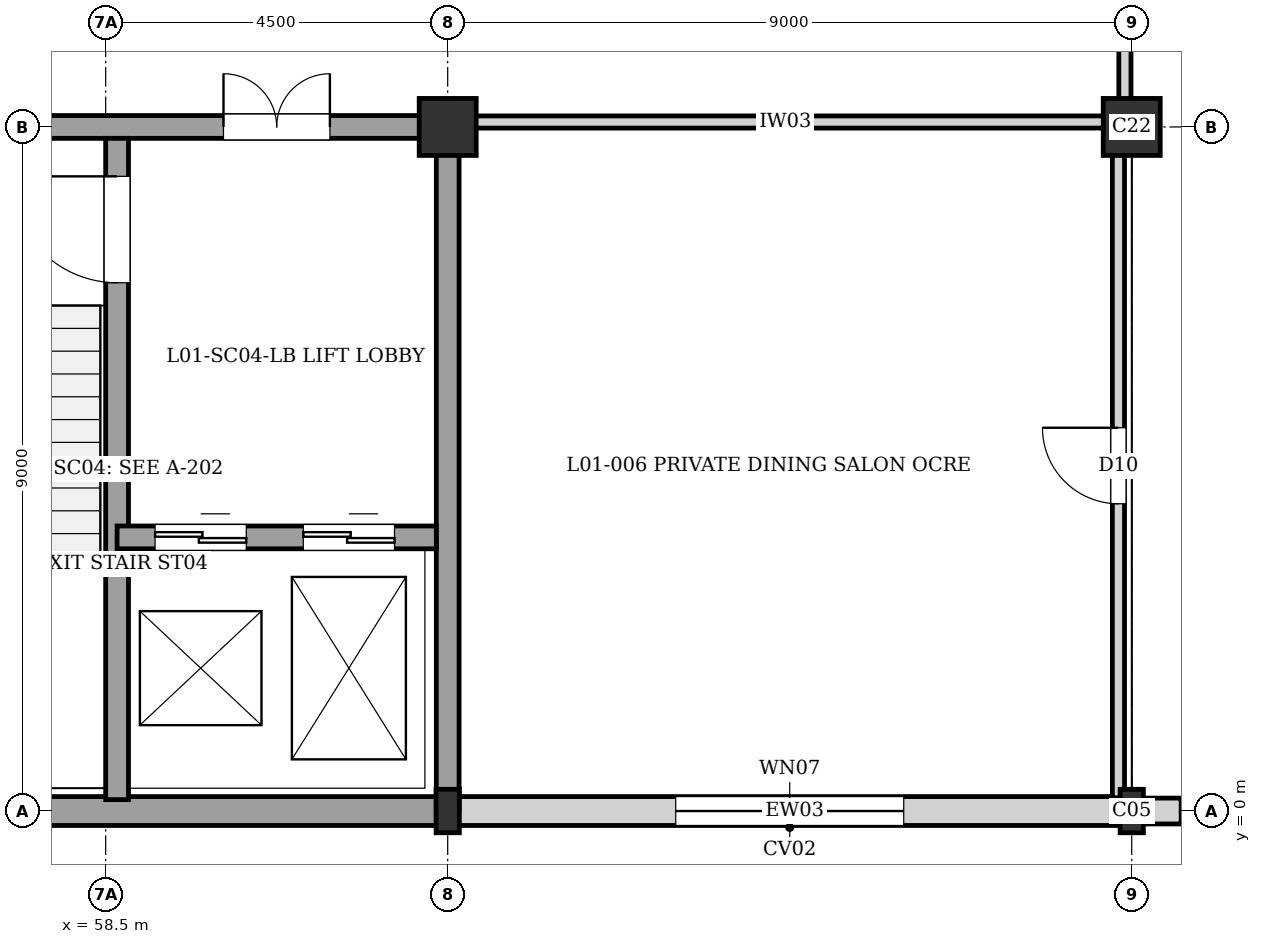
"""IFC4 building model, lengths in metres.
Left out: names, types, materials, properties, quantities, classifications, styles, units other than length and angle.
Written with IfcOpenShell. Run it as: python <this file> out.ifc"""

import sys

from ifc_helpers import new_model, si_unit, direction, frame, frame_2d, origin, origin_2d, place, context, subcontext, project, spatial, rectangle, i_section, extrude, element, fill, save


model = new_model("IFC4")
c1 = context("Model", 3, precision=1e-05, world=origin(), true_north=direction((0.0, 1.0)))
c2 = subcontext(c1, "Body", "Model", "MODEL_VIEW")
j1 = project(units=[si_unit("LENGTHUNIT", "METRE"), si_unit("PLANEANGLEUNIT", "RADIAN")], contexts=[c1])
p1 = place(None, origin())
s1 = spatial("IfcSite", under=j1, at=p1, CompositionType="ELEMENT")
p2 = place(p1, origin())
s2 = spatial("IfcBuilding", under=s1, at=p2, CompositionType="ELEMENT")
p3 = place(p2, frame((0.0, 0.0, 4.32)))
s3 = spatial("IfcBuildingStorey", under=s2, at=p3, CompositionType="ELEMENT", Elevation=4.32)
p4 = place(p3, frame((63.0, 0.0, 0.0), z_axis=(0.0, 0.0, 1.0), x_axis=(1.0, 0.0, 0.0)))
e1 = element("IfcColumn", 1, at=p4, inside=s3, PredefinedType="COLUMN", context=c2, shape_type="SweptSolid", body=[
    extrude(i_section(OverallWidth=0.306, OverallDepth=0.572, WebThickness=0.021, FlangeThickness=0.04, at=origin_2d()), origin(), (0.0, 0.0, 1.0), 3.84),
])
p5 = place(p3, frame((63.0, 9.0, 0.0), z_axis=(0.0, 0.0, 1.0), x_axis=(1.0, 0.0, 0.0)))
e2 = element("IfcColumn", 2, at=p5, inside=s3, PredefinedType="COLUMN", context=c2, shape_type="SweptSolid", body=[
    extrude(rectangle(XDim=0.75, YDim=0.75, at=origin_2d()), origin(), (0.0, 0.0, 1.0), 3.84),
])
p6 = place(p3, frame((72.0, 0.0, 0.0), z_axis=(0.0, 0.0, 1.0), x_axis=(1.0, 0.0, 0.0)))
e3 = element("IfcColumn", 3, at=p6, inside=s3, PredefinedType="COLUMN", context=c2, shape_type="SweptSolid", body=[
    extrude(i_section(OverallWidth=0.306, OverallDepth=0.572, WebThickness=0.021, FlangeThickness=0.04, at=origin_2d()), origin(), (0.0, 0.0, 1.0), 3.84),
])
p7 = place(p3, frame((72.0, 9.0, 0.0), z_axis=(0.0, 0.0, 1.0), x_axis=(1.0, 0.0, 0.0)))
e4 = element("IfcColumn", 4, at=p7, inside=s3, PredefinedType="COLUMN", context=c2, shape_type="SweptSolid", body=[
    extrude(rectangle(XDim=0.75, YDim=0.75, at=origin_2d()), origin(), (0.0, 0.0, 1.0), 3.84),
])
p8 = place(p3, frame((72.0, 0.0, 0.0), z_axis=(0.0, 0.0, 1.0), x_axis=(-1.0, 0.0, 0.0)))
e5 = element("IfcWall", 5, at=p8, inside=s3, PredefinedType="SOLIDWALL", context=c2, shape_type="SweptSolid", body=[
    extrude(rectangle(XDim=8.87, YDim=0.38, at=frame_2d((4.435, 0.0))), origin(), (0.0, 0.0, 1.0), 3.22),
])
p9 = place(p8, frame((3.0, 0.0, 0.4)))
e6 = element("IfcOpeningElement", 6, at=p9, cuts=e5, PredefinedType="OPENING", context=c2, shape_type="SweptSolid", body=[
    extrude(rectangle(XDim=3.0, YDim=2.2, at=frame_2d((1.5, 1.1))), frame((0.0, 0.2, 0.0), z_axis=(0.0, -1.0, 0.0), x_axis=(1.0, 0.0, 0.0)), (0.0, 0.0, 1.0), 0.4),
])
p10 = place(p3, frame((63.0, 0.0, 0.0), z_axis=(0.0, 0.0, 1.0), x_axis=(-1.0, 0.0, 0.0)))
e7 = element("IfcWall", 7, at=p10, inside=s3, PredefinedType="SOLIDWALL", context=c2, shape_type="SweptSolid", body=[
    extrude(rectangle(XDim=9.0, YDim=0.38, at=frame_2d((4.5, 0.0))), origin(), (0.0, 0.0, 1.0), 3.6),
])
p11 = place(p3, frame((72.65, 0.0, 0.0), z_axis=(0.0, 0.0, 1.0), x_axis=(-1.0, 0.0, 0.0)))
e8 = element("IfcWall", 8, at=p11, inside=s3, PredefinedType="SOLIDWALL", context=c2, shape_type="SweptSolid", body=[
    extrude(rectangle(XDim=0.65, YDim=0.34, at=frame_2d((0.325, 0.0))), origin(), (0.0, 0.0, 1.0), 3.18),
])
p12 = place(p3, frame((63.0, 0.0, 0.0), z_axis=(0.0, 0.0, 1.0), x_axis=(0.0, 1.0, 0.0)))
e9 = element("IfcWall", 9, at=p12, inside=s3, PredefinedType="SHEAR", context=c2, shape_type="SweptSolid", body=[
    extrude(rectangle(XDim=9.0, YDim=0.3, at=frame_2d((4.5, 0.0))), origin(), (0.0, 0.0, 1.0), 3.6),
])
p13 = place(p3, frame((54.0, 9.0, 0.0), z_axis=(0.0, 0.0, 1.0), x_axis=(1.0, 0.0, 0.0)))
e10 = element("IfcWall", 10, at=p13, inside=s3, PredefinedType="SHEAR", context=c2, shape_type="SweptSolid", body=[
    extrude(rectangle(XDim=9.0, YDim=0.3, at=frame_2d((4.5, 0.0))), origin(), (0.0, 0.0, 1.0), 3.6),
])
p14 = place(p13, frame((6.05, 0.0, 0.0)))
e11 = element("IfcOpeningElement", 11, at=p14, cuts=e10, PredefinedType="OPENING", context=c2, shape_type="SweptSolid", body=[
    extrude(rectangle(XDim=1.4, YDim=2.02, at=frame_2d((0.7, 1.01))), frame((0.0, 0.16, 0.0), z_axis=(0.0, -1.0, 0.0), x_axis=(1.0, 0.0, 0.0)), (0.0, 0.0, 1.0), 0.32),
])
p15 = place(p3, frame((58.65, 0.15, 0.0), z_axis=(0.0, 0.0, 1.0), x_axis=(0.0, 1.0, 0.0)))
e12 = element("IfcWall", 12, at=p15, inside=s3, PredefinedType="SHEAR", context=c2, shape_type="SweptSolid", body=[
    extrude(rectangle(XDim=8.7, YDim=0.3, at=frame_2d((4.35, 0.0))), origin(), (0.0, 0.0, 1.0), 3.6),
])
p16 = place(p15, frame((6.8, 0.0, 0.0)))
e13 = element("IfcOpeningElement", 13, at=p16, cuts=e12, PredefinedType="OPENING", context=c2, shape_type="SweptSolid", body=[
    extrude(rectangle(XDim=1.4, YDim=2.02, at=frame_2d((0.7, 1.01))), frame((0.0, 0.16, 0.0), z_axis=(0.0, -1.0, 0.0), x_axis=(1.0, 0.0, 0.0)), (0.0, 0.0, 1.0), 0.32),
])
p17 = place(p3, frame((58.65, 3.6, 0.0), z_axis=(0.0, 0.0, 1.0), x_axis=(1.0, 0.0, 0.0)))
e14 = element("IfcWall", 14, at=p17, inside=s3, PredefinedType="SHEAR", context=c2, shape_type="SweptSolid", body=[
    extrude(rectangle(XDim=4.2, YDim=0.3, at=frame_2d((2.1, 0.0))), origin(), (0.0, 0.0, 1.0), 3.6),
])
p18 = place(p17, frame((0.5, 0.0, 0.0)))
e15 = element("IfcOpeningElement", 15, at=p18, cuts=e14, PredefinedType="OPENING", context=c2, shape_type="SweptSolid", body=[
    extrude(rectangle(XDim=1.2, YDim=2.2, at=frame_2d((0.6, 1.1))), frame((0.0, 0.16, 0.0), z_axis=(0.0, -1.0, 0.0), x_axis=(1.0, 0.0, 0.0)), (0.0, 0.0, 1.0), 0.32),
])
p19 = place(p17, frame((2.45, 0.0, 0.0)))
e16 = element("IfcOpeningElement", 16, at=p19, cuts=e14, PredefinedType="OPENING", context=c2, shape_type="SweptSolid", body=[
    extrude(rectangle(XDim=1.2, YDim=2.2, at=frame_2d((0.6, 1.1))), frame((0.0, 0.16, 0.0), z_axis=(0.0, -1.0, 0.0), x_axis=(1.0, 0.0, 0.0)), (0.0, 0.0, 1.0), 0.32),
])
p20 = place(p3, frame((63.155, 9.065, 0.0), z_axis=(0.0, 0.0, 1.0), x_axis=(1.0, 0.0, 0.0)))
e17 = element("IfcWall", 17, at=p20, inside=s3, PredefinedType="PARTITIONING", context=c2, shape_type="SweptSolid", body=[
    extrude(rectangle(XDim=8.575, YDim=0.16, at=frame_2d((4.288, 0.0))), origin(), (0.0, 0.0, 1.0), 3.09),
])
p21 = place(p3, frame((71.91, 9.22, 0.0), z_axis=(0.0, 0.0, 1.0), x_axis=(0.0, 1.0, 0.0)))
e18 = element("IfcWall", 18, at=p21, inside=s3, PredefinedType="PARTITIONING", context=c2, shape_type="SweptSolid", body=[
    extrude(rectangle(XDim=2.86, YDim=0.16, at=frame_2d((1.43, 0.0))), origin(), (0.0, 0.0, 1.0), 3.28),
])
p22 = place(p21, frame((1.023, 0.0, 0.0)))
e19 = element("IfcOpeningElement", 19, at=p22, cuts=e18, PredefinedType="OPENING", context=c2, shape_type="SweptSolid", body=[
    extrude(rectangle(XDim=1.5, YDim=2.1, at=frame_2d((0.75, 1.05))), frame((0.0, 0.09, 0.0), z_axis=(0.0, -1.0, 0.0), x_axis=(1.0, 0.0, 0.0)), (0.0, 0.0, 1.0), 0.18),
])
p23 = place(p3, frame((71.825, 0.175, 0.0), z_axis=(0.0, 0.0, 1.0), x_axis=(0.0, 1.0, 0.0)))
e20 = element("IfcWall", 20, at=p23, inside=s3, PredefinedType="PARTITIONING", context=c2, shape_type="SweptSolid", body=[
    extrude(rectangle(XDim=8.735, YDim=0.16, at=frame_2d((4.367, 0.0))), origin(), (0.0, 0.0, 1.0), 3.59),
])
p24 = place(p23, frame((3.867, 0.0, 0.0)))
e21 = element("IfcOpeningElement", 21, at=p24, cuts=e20, PredefinedType="OPENING", context=c2, shape_type="SweptSolid", body=[
    extrude(rectangle(XDim=1.0, YDim=2.1, at=frame_2d((0.5, 1.05))), frame((0.0, 0.09, 0.0), z_axis=(0.0, -1.0, 0.0), x_axis=(1.0, 0.0, 0.0)), (0.0, 0.0, 1.0), 0.18),
])
p25 = place(p9, origin())
e22 = element("IfcWindow", 22, at=p25, inside=s3, PartitioningType="SINGLE_PANEL", PredefinedType="WINDOW", context=c2, shape_type="SweptSolid", body=[
    extrude(rectangle(XDim=3.0, YDim=2.2, at=frame_2d((1.5, 1.1))), frame((0.0, 0.03, 0.0), z_axis=(0.0, -1.0, 0.0), x_axis=(1.0, 0.0, 0.0)), (0.0, 0.0, 1.0), 0.06),
])
fill(e6, e22)
p26 = place(p14, origin())
e23 = element("IfcDoor", 23, at=p26, inside=s3, OperationType="DOUBLE_DOOR_SINGLE_SWING", PredefinedType="DOOR", context=c2, shape_type="SweptSolid", body=[
    extrude(rectangle(XDim=1.4, YDim=2.02, at=frame_2d((0.7, 1.01))), frame((0.0, 0.025, 0.0), z_axis=(0.0, -1.0, 0.0), x_axis=(1.0, 0.0, 0.0)), (0.0, 0.0, 1.0), 0.05),
])
fill(e11, e23)
p27 = place(p16, origin())
e24 = element("IfcDoor", 24, at=p27, inside=s3, OperationType="SINGLE_SWING_RIGHT", PredefinedType="DOOR", context=c2, shape_type="SweptSolid", body=[
    extrude(rectangle(XDim=1.4, YDim=2.02, at=frame_2d((0.7, 1.01))), frame((0.0, 0.025, 0.0), z_axis=(0.0, -1.0, 0.0), x_axis=(1.0, 0.0, 0.0)), (0.0, 0.0, 1.0), 0.05),
])
fill(e13, e24)
p28 = place(p18, origin())
e25 = element("IfcDoor", 25, at=p28, inside=s3, OperationType="DOUBLE_DOOR_SLIDING", PredefinedType="DOOR", context=c2, shape_type="SweptSolid", body=[
    extrude(rectangle(XDim=1.2, YDim=2.2, at=frame_2d((0.6, 1.1))), frame((0.0, 0.025, 0.0), z_axis=(0.0, -1.0, 0.0), x_axis=(1.0, 0.0, 0.0)), (0.0, 0.0, 1.0), 0.05),
])
fill(e15, e25)
p29 = place(p19, origin())
e26 = element("IfcDoor", 26, at=p29, inside=s3, OperationType="DOUBLE_DOOR_SLIDING", PredefinedType="DOOR", context=c2, shape_type="SweptSolid", body=[
    extrude(rectangle(XDim=1.2, YDim=2.2, at=frame_2d((0.6, 1.1))), frame((0.0, 0.025, 0.0), z_axis=(0.0, -1.0, 0.0), x_axis=(1.0, 0.0, 0.0)), (0.0, 0.0, 1.0), 0.05),
])
fill(e16, e26)
p30 = place(p24, origin())
e27 = element("IfcDoor", 27, at=p30, inside=s3, OperationType="SINGLE_SWING_RIGHT", PredefinedType="DOOR", context=c2, shape_type="SweptSolid", body=[
    extrude(rectangle(XDim=1.0, YDim=2.1, at=frame_2d((0.5, 1.05))), frame((0.0, 0.025, 0.0), z_axis=(0.0, -1.0, 0.0), x_axis=(1.0, 0.0, 0.0)), (0.0, 0.0, 1.0), 0.05),
])
fill(e21, e27)
save(model, sys.argv[1])
